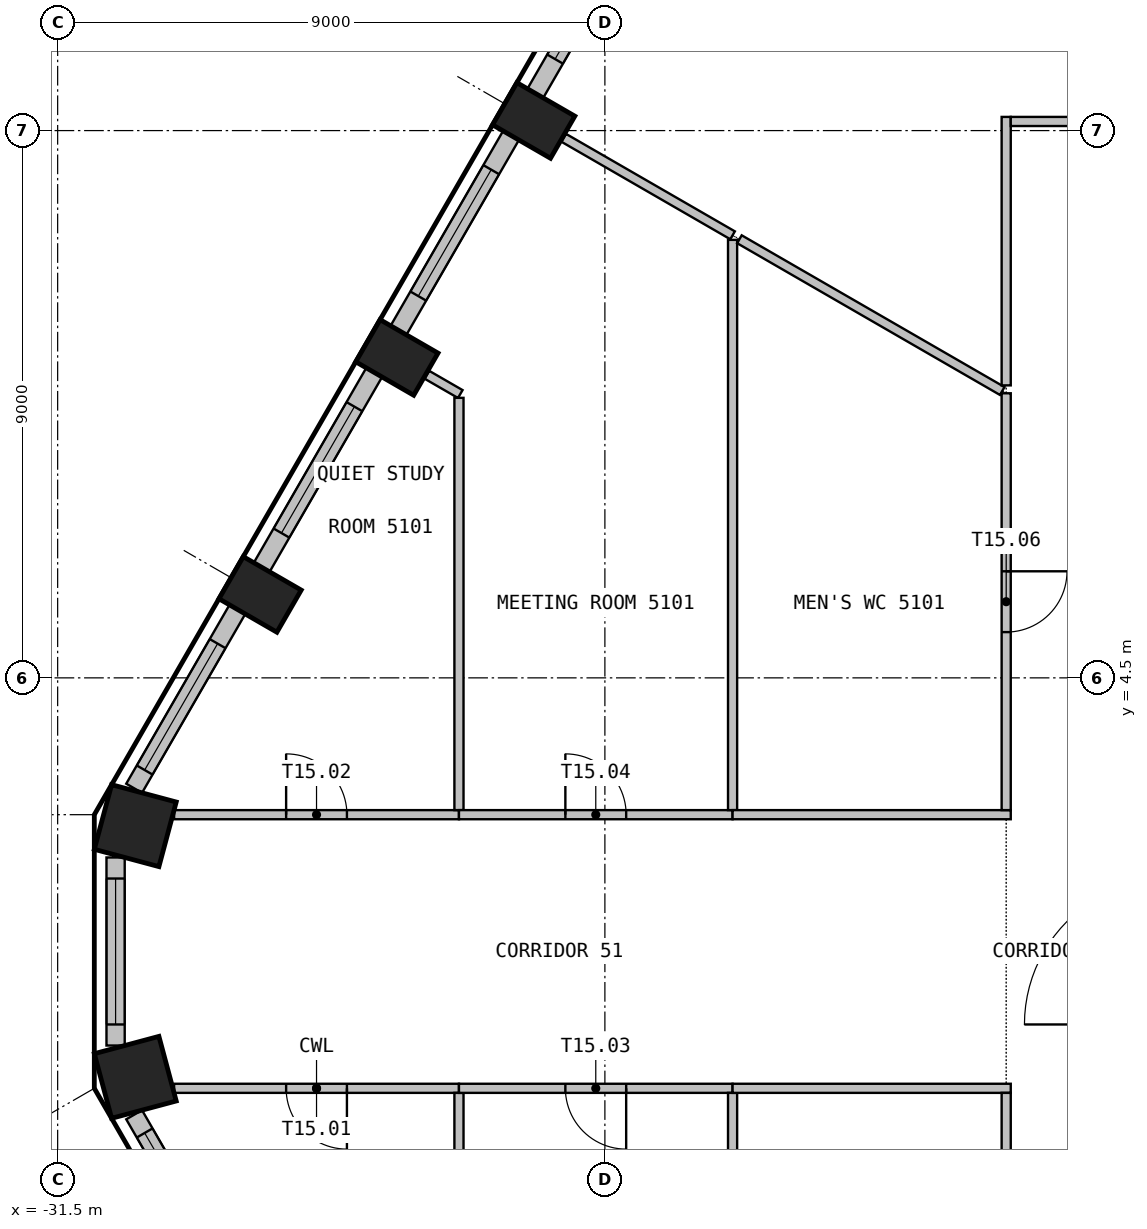
"""IFC4 building model, lengths in metres.
Left out: names, types, materials, properties, quantities, classifications, styles, units other than length and angle.
Written with IfcOpenShell. Run it as: python <this file> out.ifc"""

import sys

from ifc_helpers import new_model, si_unit, direction, frame, frame_2d, origin, origin_2d, place, context, subcontext, project, spatial, rectangle, extrude, element, fill, save


model = new_model("IFC4")
c1 = context("Model", 3, precision=1e-05, world=origin(), true_north=direction((0.0, 1.0)))
c2 = subcontext(c1, "Body", "Model", "MODEL_VIEW")
j1 = project(units=[si_unit("LENGTHUNIT", "METRE"), si_unit("PLANEANGLEUNIT", "RADIAN")], contexts=[c1])
p1 = place(None, origin())
s1 = spatial("IfcSite", under=j1, at=p1, CompositionType="ELEMENT")
p2 = place(p1, origin())
s2 = spatial("IfcBuilding", under=s1, at=p2, CompositionType="ELEMENT")
p3 = place(p2, frame((0.0, 0.0, 207.3)))
s3 = spatial("IfcBuildingStorey", under=s2, at=p3, CompositionType="ELEMENT", Elevation=207.3)
for number, where, z_axis, x_axis in (
    (1, (-23.671, 13.666, 0.0), (0.0, 0.0, 1.0), (-0.5, -0.866, 0.0)),
    (2, (-25.921, 9.769, 0.0), (0.0, 0.0, 1.0), (-0.5, -0.866, 0.0)),
    (3, (-28.171, 5.872, 0.0), (0.0, 0.0, 1.0), (-0.5, -0.866, 0.0)),
):
    element("IfcColumn", number, at=place(p3, frame(where, z_axis=z_axis, x_axis=x_axis)), inside=s3, PredefinedType="COLUMN", context=c2, shape_type="SweptSolid", body=[
        extrude(rectangle(XDim=0.8, YDim=1.1, at=origin_2d()), origin(), (0.0, 0.0, 1.0), 3.55),
    ])
for number, where, z_axis, x_axis in (
    (4, (-30.223, 2.07, 0.0), (0.0, 0.0, 1.0), (-0.259, -0.966, 0.0)),
    (5, (-30.223, -2.07, 0.0), (0.0, 0.0, 1.0), (0.259, -0.966, 0.0)),
):
    element("IfcColumn", number, at=place(p3, frame(where, z_axis=z_axis, x_axis=x_axis)), inside=s3, PredefinedType="COLUMN", context=c2, shape_type="SweptSolid", body=[
        extrude(rectangle(XDim=1.1, YDim=1.1, at=origin_2d()), origin(), (0.0, 0.0, 1.0), 3.55),
    ])
p4 = place(p3, frame((-21.794, 17.317, 0.0), z_axis=(0.0, 0.0, 1.0), x_axis=(-0.500029062817, -0.866008623709, 0.0)))
e6 = element("IfcWall", 6, at=p4, inside=s3, PredefinedType="SOLIDWALL", context=c2, shape_type="SweptSolid", body=[
    extrude(rectangle(XDim=3.699, YDim=0.3, at=frame_2d((1.85, 0.0))), origin(), (0.0, 0.0, 1.0), 3.55),
])
p5 = place(p4, frame((0.649, 0.0, 0.9)))
e7 = element("IfcOpeningElement", 7, at=p5, cuts=e6, PredefinedType="OPENING", context=c2, shape_type="SweptSolid", body=[
    extrude(rectangle(XDim=2.4, YDim=2.1, at=frame_2d((1.2, 1.05))), frame((0.0, 0.16, 0.0), z_axis=(0.0, -1.0, 0.0), x_axis=(1.0, 0.0, 0.0)), (0.0, 0.0, 1.0), 0.32),
])
p6 = place(p3, frame((-24.044, 13.419, 0.0), z_axis=(0.0, 0.0, 1.0), x_axis=(-0.500029062817, -0.866008623709, 0.0)))
e8 = element("IfcWall", 8, at=p6, inside=s3, PredefinedType="SOLIDWALL", context=c2, shape_type="SweptSolid", body=[
    extrude(rectangle(XDim=3.699, YDim=0.3, at=frame_2d((1.85, 0.0))), origin(), (0.0, 0.0, 1.0), 3.55),
])
p7 = place(p6, frame((0.649, 0.0, 0.9)))
e9 = element("IfcOpeningElement", 9, at=p7, cuts=e8, PredefinedType="OPENING", context=c2, shape_type="SweptSolid", body=[
    extrude(rectangle(XDim=2.4, YDim=2.1, at=frame_2d((1.2, 1.05))), frame((0.0, 0.16, 0.0), z_axis=(0.0, -1.0, 0.0), x_axis=(1.0, 0.0, 0.0)), (0.0, 0.0, 1.0), 0.32),
])
p8 = place(p3, frame((-26.294, 9.522, 0.0), z_axis=(0.0, 0.0, 1.0), x_axis=(-0.500029062817, -0.866008623709, 0.0)))
e10 = element("IfcWall", 10, at=p8, inside=s3, PredefinedType="SOLIDWALL", context=c2, shape_type="SweptSolid", body=[
    extrude(rectangle(XDim=3.699, YDim=0.3, at=frame_2d((1.85, 0.0))), origin(), (0.0, 0.0, 1.0), 3.55),
])
p9 = place(p8, frame((0.649, 0.0, 0.9)))
e11 = element("IfcOpeningElement", 11, at=p9, cuts=e10, PredefinedType="OPENING", context=c2, shape_type="SweptSolid", body=[
    extrude(rectangle(XDim=2.4, YDim=2.1, at=frame_2d((1.2, 1.05))), frame((0.0, 0.16, 0.0), z_axis=(0.0, -1.0, 0.0), x_axis=(1.0, 0.0, 0.0)), (0.0, 0.0, 1.0), 0.32),
])
p10 = place(p3, frame((-28.544, 5.625, 0.0), z_axis=(0.0, 0.0, 1.0), x_axis=(-0.500012868213, -0.866017974191, 0.0)))
e12 = element("IfcWall", 12, at=p10, inside=s3, PredefinedType="SOLIDWALL", context=c2, shape_type="SweptSolid", body=[
    extrude(rectangle(XDim=3.396, YDim=0.3, at=frame_2d((1.698, 0.0))), origin(), (0.0, 0.0, 1.0), 3.55),
])
p11 = place(p10, frame((0.649, 0.0, 0.9)))
e13 = element("IfcOpeningElement", 13, at=p11, cuts=e12, PredefinedType="OPENING", context=c2, shape_type="SweptSolid", body=[
    extrude(rectangle(XDim=2.4, YDim=2.1, at=frame_2d((1.2, 1.05))), frame((0.0, 0.16, 0.0), z_axis=(0.0, -1.0, 0.0), x_axis=(1.0, 0.0, 0.0)), (0.0, 0.0, 1.0), 0.32),
])
p12 = place(p3, frame((-30.547, 1.546, 0.0), z_axis=(0.0, 0.0, 1.0), x_axis=(0.0, -1.0, 0.0)))
e14 = element("IfcWall", 14, at=p12, inside=s3, PredefinedType="SOLIDWALL", context=c2, shape_type="SweptSolid", body=[
    extrude(rectangle(XDim=3.093, YDim=0.3, at=frame_2d((1.546, 0.0))), origin(), (0.0, 0.0, 1.0), 3.55),
])
p13 = place(p12, frame((0.346, 0.0, 0.9)))
e15 = element("IfcOpeningElement", 15, at=p13, cuts=e14, PredefinedType="OPENING", context=c2, shape_type="SweptSolid", body=[
    extrude(rectangle(XDim=2.4, YDim=2.1, at=frame_2d((1.2, 1.05))), frame((0.0, 0.16, 0.0), z_axis=(0.0, -1.0, 0.0), x_axis=(1.0, 0.0, 0.0)), (0.0, 0.0, 1.0), 0.32),
])
p14 = place(p3, frame((-30.242, -2.684, 0.0), z_axis=(0.0, 0.0, 1.0), x_axis=(0.500012868213, -0.866017974191, 0.0)))
e16 = element("IfcWall", 16, at=p14, inside=s3, PredefinedType="SOLIDWALL", context=c2, shape_type="SweptSolid", body=[
    extrude(rectangle(XDim=3.396, YDim=0.3, at=frame_2d((1.698, 0.0))), origin(), (0.0, 0.0, 1.0), 3.55),
])
p15 = place(p14, frame((0.346, 0.0, 0.9)))
e17 = element("IfcOpeningElement", 17, at=p15, cuts=e16, PredefinedType="OPENING", context=c2, shape_type="SweptSolid", body=[
    extrude(rectangle(XDim=2.4, YDim=2.1, at=frame_2d((1.2, 1.05))), frame((0.0, 0.16, 0.0), z_axis=(0.0, -1.0, 0.0), x_axis=(1.0, 0.0, 0.0)), (0.0, 0.0, 1.0), 0.32),
])
p16 = place(p3, frame((-24.9, -2.25, 0.0), z_axis=(0.0, 0.0, 1.0), x_axis=(-1.0, 0.0, 0.0)))
e18 = element("IfcWall", 18, at=p16, inside=s3, PredefinedType="PARTITIONING", context=c2, shape_type="SweptSolid", body=[
    extrude(rectangle(XDim=4.685, YDim=0.15, at=frame_2d((2.343, 0.0))), origin(), (0.0, 0.0, 1.0), 3.55),
])
p17 = place(p16, frame((1.843, 0.0, 0.0)))
e19 = element("IfcOpeningElement", 19, at=p17, cuts=e18, PredefinedType="OPENING", context=c2, shape_type="SweptSolid", body=[
    extrude(rectangle(XDim=1.0, YDim=2.1, at=frame_2d((0.5, 1.05))), frame((0.0, 0.085, 0.0), z_axis=(0.0, -1.0, 0.0), x_axis=(1.0, 0.0, 0.0)), (0.0, 0.0, 1.0), 0.17),
])
p18 = place(p3, frame((-29.585, 2.25, 0.0), z_axis=(0.0, 0.0, 1.0), x_axis=(1.0, 0.0, 0.0)))
e20 = element("IfcWall", 20, at=p18, inside=s3, PredefinedType="PARTITIONING", context=c2, shape_type="SweptSolid", body=[
    extrude(rectangle(XDim=4.685, YDim=0.15, at=frame_2d((2.343, 0.0))), origin(), (0.0, 0.0, 1.0), 3.55),
])
p19 = place(p18, frame((1.843, 0.0, 0.0)))
e21 = element("IfcOpeningElement", 21, at=p19, cuts=e20, PredefinedType="OPENING", context=c2, shape_type="SweptSolid", body=[
    extrude(rectangle(XDim=1.0, YDim=2.1, at=frame_2d((0.5, 1.05))), frame((0.0, 0.085, 0.0), z_axis=(0.0, -1.0, 0.0), x_axis=(1.0, 0.0, 0.0)), (0.0, 0.0, 1.0), 0.17),
])
p20 = place(p3, frame((-25.427, 9.484, 0.0), z_axis=(0.0, 0.0, 1.0), x_axis=(0.86590958411, -0.500200551925, 0.0)))
e22 = element("IfcWall", 22, at=p20, inside=s3, PredefinedType="PARTITIONING", context=c2, shape_type="SweptSolid", body=[
    extrude(rectangle(XDim=0.634, YDim=0.15, at=frame_2d((0.317, 0.0))), origin(), (0.0, 0.0, 1.0), 3.55),
])
p21 = place(p3, frame((-24.9, -2.325, 0.0), z_axis=(0.0, 0.0, 1.0), x_axis=(0.0, -1.0, 0.0)))
e23 = element("IfcWall", 23, at=p21, inside=s3, PredefinedType="PARTITIONING", context=c2, shape_type="SweptSolid", body=[
    extrude(rectangle(XDim=6.78, YDim=0.15, at=frame_2d((3.39, 0.0))), origin(), (0.0, 0.0, 1.0), 3.55),
])
p22 = place(p3, frame((-20.4, -2.25, 0.0), z_axis=(0.0, 0.0, 1.0), x_axis=(-1.0, 0.0, 0.0)))
e24 = element("IfcWall", 24, at=p22, inside=s3, PredefinedType="PARTITIONING", context=c2, shape_type="SweptSolid", body=[
    extrude(rectangle(XDim=4.5, YDim=0.15, at=frame_2d((2.25, 0.0))), origin(), (0.0, 0.0, 1.0), 3.55),
])
p23 = place(p22, frame((1.75, 0.0, 0.0)))
e25 = element("IfcOpeningElement", 25, at=p23, cuts=e24, PredefinedType="OPENING", context=c2, shape_type="SweptSolid", body=[
    extrude(rectangle(XDim=1.0, YDim=2.1, at=frame_2d((0.5, 1.05))), frame((0.0, 0.085, 0.0), z_axis=(0.0, -1.0, 0.0), x_axis=(1.0, 0.0, 0.0)), (0.0, 0.0, 1.0), 0.17),
])
p24 = place(p3, frame((-24.9, 9.105, 0.0), z_axis=(0.0, 0.0, 1.0), x_axis=(0.0, -1.0, 0.0)))
e26 = element("IfcWall", 26, at=p24, inside=s3, PredefinedType="PARTITIONING", context=c2, shape_type="SweptSolid", body=[
    extrude(rectangle(XDim=6.78, YDim=0.15, at=frame_2d((3.39, 0.0))), origin(), (0.0, 0.0, 1.0), 3.55),
])
p25 = place(p3, frame((-24.9, 2.25, 0.0), z_axis=(0.0, 0.0, 1.0), x_axis=(1.0, 0.0, 0.0)))
e27 = element("IfcWall", 27, at=p25, inside=s3, PredefinedType="PARTITIONING", context=c2, shape_type="SweptSolid", body=[
    extrude(rectangle(XDim=4.5, YDim=0.15, at=frame_2d((2.25, 0.0))), origin(), (0.0, 0.0, 1.0), 3.55),
])
p26 = place(p25, frame((1.75, 0.0, 0.0)))
e28 = element("IfcOpeningElement", 28, at=p26, cuts=e27, PredefinedType="OPENING", context=c2, shape_type="SweptSolid", body=[
    extrude(rectangle(XDim=1.0, YDim=2.1, at=frame_2d((0.5, 1.05))), frame((0.0, 0.085, 0.0), z_axis=(0.0, -1.0, 0.0), x_axis=(1.0, 0.0, 0.0)), (0.0, 0.0, 1.0), 0.17),
])
p27 = place(p3, frame((-23.177, 13.381, 0.0), z_axis=(0.0, 0.0, 1.0), x_axis=(0.866089241828, -0.499889412961, 0.0)))
e29 = element("IfcWall", 29, at=p27, inside=s3, PredefinedType="PARTITIONING", context=c2, shape_type="SweptSolid", body=[
    extrude(rectangle(XDim=3.207, YDim=0.15, at=frame_2d((1.604, 0.0))), origin(), (0.0, 0.0, 1.0), 3.55),
])
p28 = place(p3, frame((-20.4, -2.325, 0.0), z_axis=(0.0, 0.0, 1.0), x_axis=(0.0, -1.0, 0.0)))
e30 = element("IfcWall", 30, at=p28, inside=s3, PredefinedType="PARTITIONING", context=c2, shape_type="SweptSolid", body=[
    extrude(rectangle(XDim=4.157, YDim=0.15, at=frame_2d((2.079, 0.0))), origin(), (0.0, 0.0, 1.0), 3.55),
])
p29 = place(p3, frame((-15.825, -2.25, 0.0), z_axis=(0.0, 0.0, 1.0), x_axis=(-1.0, 0.0, 0.0)))
e31 = element("IfcWall", 31, at=p29, inside=s3, PredefinedType="PARTITIONING", context=c2, shape_type="SweptSolid", body=[
    extrude(rectangle(XDim=4.575, YDim=0.15, at=frame_2d((2.288, 0.0))), origin(), (0.0, 0.0, 1.0), 3.55),
])
p30 = place(p3, frame((-20.4, 11.703, 0.0), z_axis=(0.0, 0.0, 1.0), x_axis=(0.0, -1.0, 0.0)))
e32 = element("IfcWall", 32, at=p30, inside=s3, PredefinedType="PARTITIONING", context=c2, shape_type="SweptSolid", body=[
    extrude(rectangle(XDim=9.378, YDim=0.15, at=frame_2d((4.689, 0.0))), origin(), (0.0, 0.0, 1.0), 3.55),
])
p31 = place(p3, frame((-20.4, 2.25, 0.0), z_axis=(0.0, 0.0, 1.0), x_axis=(1.0, 0.0, 0.0)))
e33 = element("IfcWall", 33, at=p31, inside=s3, PredefinedType="PARTITIONING", context=c2, shape_type="SweptSolid", body=[
    extrude(rectangle(XDim=4.575, YDim=0.15, at=frame_2d((2.288, 0.0))), origin(), (0.0, 0.0, 1.0), 3.55),
])
p32 = place(p3, frame((-20.287, 11.713, 0.0), z_axis=(0.0, 0.0, 1.0), x_axis=(0.866034070548, -0.499984988425, 0.0)))
e34 = element("IfcWall", 34, at=p32, inside=s3, PredefinedType="PARTITIONING", context=c2, shape_type="SweptSolid", body=[
    extrude(rectangle(XDim=4.991, YDim=0.15, at=frame_2d((2.496, 0.0))), origin(), (0.0, 0.0, 1.0), 3.55),
])
p33 = place(p3, frame((-15.9, -2.325, 0.0), z_axis=(0.0, 0.0, 1.0), x_axis=(0.0, -1.0, 0.0)))
e35 = element("IfcWall", 35, at=p33, inside=s3, PredefinedType="PARTITIONING", context=c2, shape_type="SweptSolid", body=[
    extrude(rectangle(XDim=11.4, YDim=0.15, at=frame_2d((5.7, 0.0))), origin(), (0.0, 0.0, 1.0), 3.55),
])
p34 = place(p33, frame((5.2, 0.0, 0.0)))
e36 = element("IfcOpeningElement", 36, at=p34, cuts=e35, PredefinedType="OPENING", context=c2, shape_type="SweptSolid", body=[
    extrude(rectangle(XDim=1.0, YDim=2.1, at=frame_2d((0.5, 1.05))), frame((0.0, 0.085, 0.0), z_axis=(0.0, -1.0, 0.0), x_axis=(1.0, 0.0, 0.0)), (0.0, 0.0, 1.0), 0.17),
])
p35 = place(p3, frame((-15.9, 9.18, 0.0), z_axis=(0.0, 0.0, 1.0), x_axis=(0.0, -1.0, 0.0)))
e37 = element("IfcWall", 37, at=p35, inside=s3, PredefinedType="PARTITIONING", context=c2, shape_type="SweptSolid", body=[
    extrude(rectangle(XDim=6.855, YDim=0.15, at=frame_2d((3.427, 0.0))), origin(), (0.0, 0.0, 1.0), 3.55),
])
p36 = place(p35, frame((2.927, 0.0, 0.0)))
e38 = element("IfcOpeningElement", 38, at=p36, cuts=e37, PredefinedType="OPENING", context=c2, shape_type="SweptSolid", body=[
    extrude(rectangle(XDim=1.0, YDim=2.1, at=frame_2d((0.5, 1.05))), frame((0.0, 0.085, 0.0), z_axis=(0.0, -1.0, 0.0), x_axis=(1.0, 0.0, 0.0)), (0.0, 0.0, 1.0), 0.17),
])
p37 = place(p3, frame((-15.9, 13.725, 0.0), z_axis=(0.0, 0.0, 1.0), x_axis=(0.0, -1.0, 0.0)))
e39 = element("IfcWall", 39, at=p37, inside=s3, PredefinedType="PARTITIONING", context=c2, shape_type="SweptSolid", body=[
    extrude(rectangle(XDim=4.415, YDim=0.15, at=frame_2d((2.208, 0.0))), origin(), (0.0, 0.0, 1.0), 3.55),
])
p38 = place(p3, frame((-11.25, 13.65, 0.0), z_axis=(0.0, 0.0, 1.0), x_axis=(-1.0, 0.0, 0.0)))
e40 = element("IfcWall", 40, at=p38, inside=s3, PredefinedType="PARTITIONING", context=c2, shape_type="SweptSolid", body=[
    extrude(rectangle(XDim=4.575, YDim=0.15, at=frame_2d((2.288, 0.0))), origin(), (0.0, 0.0, 1.0), 3.55),
])
p39 = place(p38, frame((1.788, 0.0, 0.0)))
e41 = element("IfcOpeningElement", 41, at=p39, cuts=e40, PredefinedType="OPENING", context=c2, shape_type="SweptSolid", body=[
    extrude(rectangle(XDim=1.0, YDim=2.1, at=frame_2d((0.5, 1.05))), frame((0.0, 0.085, 0.0), z_axis=(0.0, -1.0, 0.0), x_axis=(1.0, 0.0, 0.0)), (0.0, 0.0, 1.0), 0.17),
])
p40 = place(p5, origin())
e42 = element("IfcWindow", 42, at=p40, inside=s3, PartitioningType="SINGLE_PANEL", PredefinedType="WINDOW", context=c2, shape_type="SweptSolid", body=[
    extrude(rectangle(XDim=2.4, YDim=2.1, at=frame_2d((1.2, 1.05))), frame((0.0, 0.03, 0.0), z_axis=(0.0, -1.0, 0.0), x_axis=(1.0, 0.0, 0.0)), (0.0, 0.0, 1.0), 0.06),
])
fill(e7, e42)
p41 = place(p7, origin())
e43 = element("IfcWindow", 43, at=p41, inside=s3, PartitioningType="SINGLE_PANEL", PredefinedType="WINDOW", context=c2, shape_type="SweptSolid", body=[
    extrude(rectangle(XDim=2.4, YDim=2.1, at=frame_2d((1.2, 1.05))), frame((0.0, 0.03, 0.0), z_axis=(0.0, -1.0, 0.0), x_axis=(1.0, 0.0, 0.0)), (0.0, 0.0, 1.0), 0.06),
])
fill(e9, e43)
p42 = place(p9, origin())
e44 = element("IfcWindow", 44, at=p42, inside=s3, PartitioningType="SINGLE_PANEL", PredefinedType="WINDOW", context=c2, shape_type="SweptSolid", body=[
    extrude(rectangle(XDim=2.4, YDim=2.1, at=frame_2d((1.2, 1.05))), frame((0.0, 0.03, 0.0), z_axis=(0.0, -1.0, 0.0), x_axis=(1.0, 0.0, 0.0)), (0.0, 0.0, 1.0), 0.06),
])
fill(e11, e44)
p43 = place(p11, origin())
e45 = element("IfcWindow", 45, at=p43, inside=s3, PartitioningType="SINGLE_PANEL", PredefinedType="WINDOW", context=c2, shape_type="SweptSolid", body=[
    extrude(rectangle(XDim=2.4, YDim=2.1, at=frame_2d((1.2, 1.05))), frame((0.0, 0.03, 0.0), z_axis=(0.0, -1.0, 0.0), x_axis=(1.0, 0.0, 0.0)), (0.0, 0.0, 1.0), 0.06),
])
fill(e13, e45)
p44 = place(p13, origin())
e46 = element("IfcWindow", 46, at=p44, inside=s3, PartitioningType="SINGLE_PANEL", PredefinedType="WINDOW", context=c2, shape_type="SweptSolid", body=[
    extrude(rectangle(XDim=2.4, YDim=2.1, at=frame_2d((1.2, 1.05))), frame((0.0, 0.03, 0.0), z_axis=(0.0, -1.0, 0.0), x_axis=(1.0, 0.0, 0.0)), (0.0, 0.0, 1.0), 0.06),
])
fill(e15, e46)
p45 = place(p15, origin())
e47 = element("IfcWindow", 47, at=p45, inside=s3, PartitioningType="SINGLE_PANEL", PredefinedType="WINDOW", context=c2, shape_type="SweptSolid", body=[
    extrude(rectangle(XDim=2.4, YDim=2.1, at=frame_2d((1.2, 1.05))), frame((0.0, 0.03, 0.0), z_axis=(0.0, -1.0, 0.0), x_axis=(1.0, 0.0, 0.0)), (0.0, 0.0, 1.0), 0.06),
])
fill(e17, e47)
p46 = place(p17, origin())
e48 = element("IfcDoor", 48, at=p46, inside=s3, OperationType="SINGLE_SWING_RIGHT", PredefinedType="DOOR", context=c2, shape_type="SweptSolid", body=[
    extrude(rectangle(XDim=1.0, YDim=2.1, at=frame_2d((0.5, 1.05))), frame((0.0, 0.025, 0.0), z_axis=(0.0, -1.0, 0.0), x_axis=(1.0, 0.0, 0.0)), (0.0, 0.0, 1.0), 0.05),
])
fill(e19, e48)
p47 = place(p19, origin())
e49 = element("IfcDoor", 49, at=p47, inside=s3, OperationType="SINGLE_SWING_LEFT", PredefinedType="DOOR", context=c2, shape_type="SweptSolid", body=[
    extrude(rectangle(XDim=1.0, YDim=2.1, at=frame_2d((0.5, 1.05))), frame((0.0, 0.025, 0.0), z_axis=(0.0, -1.0, 0.0), x_axis=(1.0, 0.0, 0.0)), (0.0, 0.0, 1.0), 0.05),
])
fill(e21, e49)
p48 = place(p23, origin())
e50 = element("IfcDoor", 50, at=p48, inside=s3, OperationType="SINGLE_SWING_RIGHT", PredefinedType="DOOR", context=c2, shape_type="SweptSolid", body=[
    extrude(rectangle(XDim=1.0, YDim=2.1, at=frame_2d((0.5, 1.05))), frame((0.0, 0.025, 0.0), z_axis=(0.0, -1.0, 0.0), x_axis=(1.0, 0.0, 0.0)), (0.0, 0.0, 1.0), 0.05),
])
fill(e25, e50)
p49 = place(p26, origin())
e51 = element("IfcDoor", 51, at=p49, inside=s3, OperationType="SINGLE_SWING_RIGHT", PredefinedType="DOOR", context=c2, shape_type="SweptSolid", body=[
    extrude(rectangle(XDim=1.0, YDim=2.1, at=frame_2d((0.5, 1.05))), frame((0.0, 0.025, 0.0), z_axis=(0.0, -1.0, 0.0), x_axis=(1.0, 0.0, 0.0)), (0.0, 0.0, 1.0), 0.05),
])
fill(e28, e51)
p50 = place(p36, origin())
e52 = element("IfcDoor", 52, at=p50, inside=s3, OperationType="SINGLE_SWING_RIGHT", PredefinedType="DOOR", context=c2, shape_type="SweptSolid", body=[
    extrude(rectangle(XDim=1.0, YDim=2.1, at=frame_2d((0.5, 1.05))), frame((0.0, 0.025, 0.0), z_axis=(0.0, -1.0, 0.0), x_axis=(1.0, 0.0, 0.0)), (0.0, 0.0, 1.0), 0.05),
])
fill(e38, e52)
save(model, sys.argv[1])
